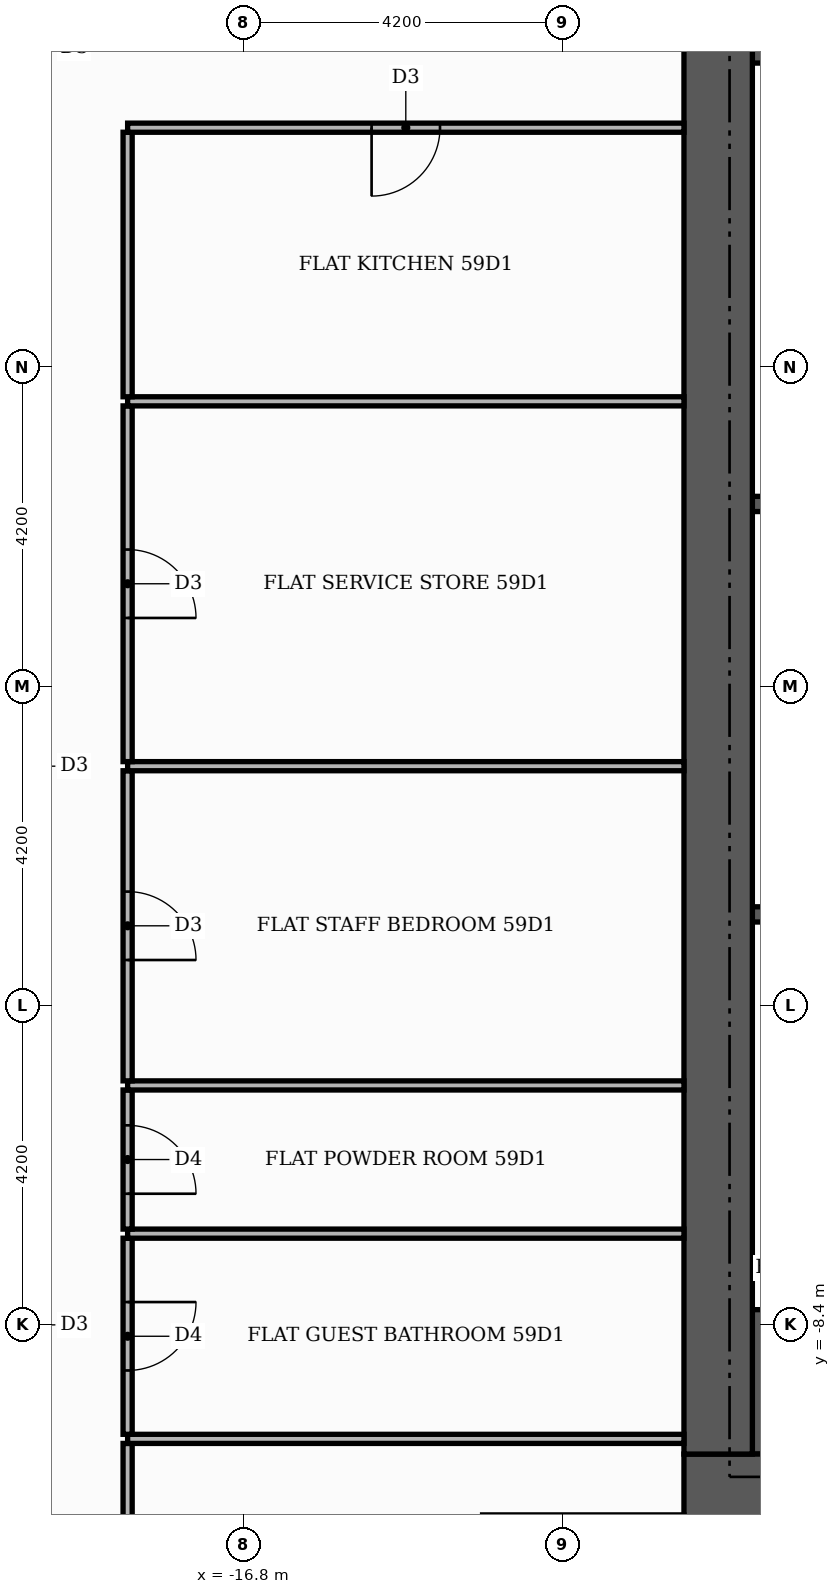
"""IFC4 building model, lengths in metres.
Left out: names, types, materials, properties, quantities, classifications, styles, units other than length and angle.
Written with IfcOpenShell. Run it as: python <this file> out.ifc"""

import sys

from ifc_helpers import new_model, si_unit, direction, frame, frame_2d, origin, place, context, subcontext, project, spatial, rectangle, extrude, element, fill, save


model = new_model("IFC4")
c1 = context("Model", 3, precision=1e-05, world=origin(), true_north=direction((0.0, 1.0)))
c2 = subcontext(c1, "Body", "Model", "MODEL_VIEW")
j1 = project(units=[si_unit("LENGTHUNIT", "METRE"), si_unit("PLANEANGLEUNIT", "RADIAN")], contexts=[c1])
p1 = place(None, origin())
s1 = spatial("IfcSite", under=j1, at=p1, CompositionType="ELEMENT")
p2 = place(p1, origin())
s2 = spatial("IfcBuilding", under=s1, at=p2, CompositionType="ELEMENT")
p3 = place(p2, frame((0.0, 0.0, 248.4)))
s3 = spatial("IfcBuildingStorey", under=s2, at=p3, CompositionType="ELEMENT", Elevation=248.4)
for number, where, z_axis, x_axis in (
    (1, (-10.1, -9.15, 0.0), (0.0, 0.0, 1.0), (1.0, 0.0, 0.0)),
    (2, (-10.1, 9.15, 0.0), (0.0, 0.0, 1.0), (1.0, 0.0, 0.0)),
):
    element("IfcWall", number, at=place(p3, frame(where, z_axis=z_axis, x_axis=x_axis)), inside=s3, PredefinedType="SHEAR", context=c2, shape_type="SweptSolid", body=[
        extrude(rectangle(XDim=4.6, YDim=1.9, at=frame_2d((2.3, 0.0))), origin(), (0.0, 0.0, 1.0), 3.48),
    ])
for number, where, z_axis, x_axis in (
    (3, (-10.1, -3.0, 0.0), (0.0, 0.0, 1.0), (1.0, 0.0, 0.0)),
    (4, (-10.1, 2.4, 0.0), (0.0, 0.0, 1.0), (1.0, 0.0, 0.0)),
):
    element("IfcWall", number, at=place(p3, frame(where, z_axis=z_axis, x_axis=x_axis)), inside=s3, PredefinedType="SHEAR", context=c2, shape_type="SweptSolid", body=[
        extrude(rectangle(XDim=0.9, YDim=0.2, at=frame_2d((0.45, 0.0))), origin(), (0.0, 0.0, 1.0), 3.48),
    ])
p4 = place(p3, frame((-11.0, -10.55, 0.0), z_axis=(0.0, 0.0, 1.0), x_axis=(1.0, 0.0, 0.0)))
e5 = element("IfcWall", 5, at=p4, inside=s3, PredefinedType="SHEAR", context=c2, shape_type="SweptSolid", body=[
    extrude(rectangle(XDim=22.0, YDim=0.9, at=frame_2d((11.0, 0.0))), origin(), (0.0, 0.0, 1.0), 3.48),
])
p5 = place(p4, frame((7.4, 0.0, 0.0)))
e6 = element("IfcOpeningElement", 6, at=p5, cuts=e5, PredefinedType="OPENING", context=c2, shape_type="SweptSolid", body=[
    extrude(rectangle(XDim=1.8, YDim=2.2, at=frame_2d((0.9, 1.1))), frame((0.0, 0.46, 0.0), z_axis=(0.0, -1.0, 0.0), x_axis=(1.0, 0.0, 0.0)), (0.0, 0.0, 1.0), 0.92),
])
p6 = place(p3, frame((-10.55, -10.1, 0.0), z_axis=(0.0, 0.0, 1.0), x_axis=(0.0, 1.0, 0.0)))
e7 = element("IfcWall", 7, at=p6, inside=s3, PredefinedType="SHEAR", context=c2, shape_type="SweptSolid", body=[
    extrude(rectangle(XDim=20.2, YDim=0.9, at=frame_2d((10.1, 0.0))), origin(), (0.0, 0.0, 1.0), 3.48),
])
p7 = place(p3, frame((-18.32, -13.55, 0.0), z_axis=(0.0, 0.0, 1.0), x_axis=(0.0, 1.0, 0.0)))
e8 = element("IfcWall", 8, at=p7, inside=s3, PredefinedType="PARTITIONING", context=c2, shape_type="SweptSolid", body=[
    extrude(rectangle(XDim=3.59, YDim=0.12, at=frame_2d((1.795, 0.0))), origin(), (0.0, 0.0, 1.0), 3.48),
])
p8 = place(p7, frame((1.325, 0.0, 0.0)))
e9 = element("IfcOpeningElement", 9, at=p8, cuts=e8, PredefinedType="OPENING", context=c2, shape_type="SweptSolid", body=[
    extrude(rectangle(XDim=0.9, YDim=2.1, at=frame_2d((0.45, 1.05))), frame((0.0, 0.07, 0.0), z_axis=(0.0, -1.0, 0.0), x_axis=(1.0, 0.0, 0.0)), (0.0, 0.0, 1.0), 0.14),
])
p9 = place(p3, frame((-18.32, -9.9, 0.0), z_axis=(0.0, 0.0, 1.0), x_axis=(1.0, 0.0, 0.0)))
e10 = element("IfcWall", 10, at=p9, inside=s3, PredefinedType="PARTITIONING", context=c2, shape_type="SweptSolid", body=[
    extrude(rectangle(XDim=7.32, YDim=0.12, at=frame_2d((3.66, 0.0))), origin(), (0.0, 0.0, 1.0), 3.48),
])
p10 = place(p3, frame((-18.32, -9.84, 0.0), z_axis=(0.0, 0.0, 1.0), x_axis=(0.0, 1.0, 0.0)))
e11 = element("IfcWall", 11, at=p10, inside=s3, PredefinedType="PARTITIONING", context=c2, shape_type="SweptSolid", body=[
    extrude(rectangle(XDim=2.58, YDim=0.12, at=frame_2d((1.29, 0.0))), origin(), (0.0, 0.0, 1.0), 3.48),
])
p11 = place(p10, frame((0.84, 0.0, 0.0)))
e12 = element("IfcOpeningElement", 12, at=p11, cuts=e11, PredefinedType="OPENING", context=c2, shape_type="SweptSolid", body=[
    extrude(rectangle(XDim=0.9, YDim=2.1, at=frame_2d((0.45, 1.05))), frame((0.0, 0.07, 0.0), z_axis=(0.0, -1.0, 0.0), x_axis=(1.0, 0.0, 0.0)), (0.0, 0.0, 1.0), 0.14),
])
p12 = place(p3, frame((-18.32, -7.2, 0.0), z_axis=(0.0, 0.0, 1.0), x_axis=(1.0, 0.0, 0.0)))
e13 = element("IfcWall", 13, at=p12, inside=s3, PredefinedType="PARTITIONING", context=c2, shape_type="SweptSolid", body=[
    extrude(rectangle(XDim=7.32, YDim=0.12, at=frame_2d((3.66, 0.0))), origin(), (0.0, 0.0, 1.0), 3.48),
])
p13 = place(p3, frame((-18.32, -7.14, 0.0), z_axis=(0.0, 0.0, 1.0), x_axis=(0.0, 1.0, 0.0)))
e14 = element("IfcWall", 14, at=p13, inside=s3, PredefinedType="PARTITIONING", context=c2, shape_type="SweptSolid", body=[
    extrude(rectangle(XDim=1.83, YDim=0.12, at=frame_2d((0.915, 0.0))), origin(), (0.0, 0.0, 1.0), 3.48),
])
p14 = place(p13, frame((0.465, 0.0, 0.0)))
e15 = element("IfcOpeningElement", 15, at=p14, cuts=e14, PredefinedType="OPENING", context=c2, shape_type="SweptSolid", body=[
    extrude(rectangle(XDim=0.9, YDim=2.1, at=frame_2d((0.45, 1.05))), frame((0.0, 0.07, 0.0), z_axis=(0.0, -1.0, 0.0), x_axis=(1.0, 0.0, 0.0)), (0.0, 0.0, 1.0), 0.14),
])
p15 = place(p3, frame((-18.32, -5.25, 0.0), z_axis=(0.0, 0.0, 1.0), x_axis=(1.0, 0.0, 0.0)))
e16 = element("IfcWall", 16, at=p15, inside=s3, PredefinedType="PARTITIONING", context=c2, shape_type="SweptSolid", body=[
    extrude(rectangle(XDim=7.32, YDim=0.12, at=frame_2d((3.66, 0.0))), origin(), (0.0, 0.0, 1.0), 3.48),
])
p16 = place(p3, frame((-18.32, -5.19, 0.0), z_axis=(0.0, 0.0, 1.0), x_axis=(0.0, 1.0, 0.0)))
e17 = element("IfcWall", 17, at=p16, inside=s3, PredefinedType="PARTITIONING", context=c2, shape_type="SweptSolid", body=[
    extrude(rectangle(XDim=4.08, YDim=0.12, at=frame_2d((2.04, 0.0))), origin(), (0.0, 0.0, 1.0), 3.48),
])
p17 = place(p16, frame((1.59, 0.0, 0.0)))
e18 = element("IfcOpeningElement", 18, at=p17, cuts=e17, PredefinedType="OPENING", context=c2, shape_type="SweptSolid", body=[
    extrude(rectangle(XDim=0.9, YDim=2.1, at=frame_2d((0.45, 1.05))), frame((0.0, 0.07, 0.0), z_axis=(0.0, -1.0, 0.0), x_axis=(1.0, 0.0, 0.0)), (0.0, 0.0, 1.0), 0.14),
])
p18 = place(p3, frame((-18.32, -1.05, 0.0), z_axis=(0.0, 0.0, 1.0), x_axis=(1.0, 0.0, 0.0)))
e19 = element("IfcWall", 19, at=p18, inside=s3, PredefinedType="PARTITIONING", context=c2, shape_type="SweptSolid", body=[
    extrude(rectangle(XDim=7.32, YDim=0.12, at=frame_2d((3.66, 0.0))), origin(), (0.0, 0.0, 1.0), 3.48),
])
p19 = place(p3, frame((-18.32, -0.99, 0.0), z_axis=(0.0, 0.0, 1.0), x_axis=(0.0, 1.0, 0.0)))
e20 = element("IfcWall", 20, at=p19, inside=s3, PredefinedType="PARTITIONING", context=c2, shape_type="SweptSolid", body=[
    extrude(rectangle(XDim=4.68, YDim=0.12, at=frame_2d((2.34, 0.0))), origin(), (0.0, 0.0, 1.0), 3.48),
])
p20 = place(p19, frame((1.89, 0.0, 0.0)))
e21 = element("IfcOpeningElement", 21, at=p20, cuts=e20, PredefinedType="OPENING", context=c2, shape_type="SweptSolid", body=[
    extrude(rectangle(XDim=0.9, YDim=2.1, at=frame_2d((0.45, 1.05))), frame((0.0, 0.07, 0.0), z_axis=(0.0, -1.0, 0.0), x_axis=(1.0, 0.0, 0.0)), (0.0, 0.0, 1.0), 0.14),
])
p21 = place(p3, frame((-18.32, 3.75, 0.0), z_axis=(0.0, 0.0, 1.0), x_axis=(1.0, 0.0, 0.0)))
e22 = element("IfcWall", 22, at=p21, inside=s3, PredefinedType="PARTITIONING", context=c2, shape_type="SweptSolid", body=[
    extrude(rectangle(XDim=7.32, YDim=0.12, at=frame_2d((3.66, 0.0))), origin(), (0.0, 0.0, 1.0), 3.48),
])
p22 = place(p3, frame((-18.32, 3.81, 0.0), z_axis=(0.0, 0.0, 1.0), x_axis=(0.0, 1.0, 0.0)))
e23 = element("IfcWall", 23, at=p22, inside=s3, PredefinedType="PARTITIONING", context=c2, shape_type="SweptSolid", body=[
    extrude(rectangle(XDim=3.48, YDim=0.12, at=frame_2d((1.74, 0.0))), origin(), (0.0, 0.0, 1.0), 3.48),
])
p23 = place(p3, frame((-18.32, 7.35, 0.0), z_axis=(0.0, 0.0, 1.0), x_axis=(1.0, 0.0, 0.0)))
e24 = element("IfcWall", 24, at=p23, inside=s3, PredefinedType="PARTITIONING", context=c2, shape_type="SweptSolid", body=[
    extrude(rectangle(XDim=7.32, YDim=0.12, at=frame_2d((3.66, 0.0))), origin(), (0.0, 0.0, 1.0), 3.48),
])
p24 = place(p23, frame((3.21, 0.0, 0.0)))
e25 = element("IfcOpeningElement", 25, at=p24, cuts=e24, PredefinedType="OPENING", context=c2, shape_type="SweptSolid", body=[
    extrude(rectangle(XDim=0.9, YDim=2.1, at=frame_2d((0.45, 1.05))), frame((0.0, 0.07, 0.0), z_axis=(0.0, -1.0, 0.0), x_axis=(1.0, 0.0, 0.0)), (0.0, 0.0, 1.0), 0.14),
])
p25 = place(p24, frame((0.9, 0.0, 0.0), z_axis=(0.0, 0.0, 1.0), x_axis=(-1.0, 0.0, 0.0)))
e26 = element("IfcDoor", 26, at=p25, inside=s3, OperationType="SINGLE_SWING_LEFT", PredefinedType="DOOR", context=c2, shape_type="SweptSolid", body=[
    extrude(rectangle(XDim=0.9, YDim=2.1, at=frame_2d((0.45, 1.05))), frame((0.0, 0.025, 0.0), z_axis=(0.0, -1.0, 0.0), x_axis=(1.0, 0.0, 0.0)), (0.0, 0.0, 1.0), 0.05),
])
fill(e25, e26)
p26 = place(p20, frame((0.9, 0.0, 0.0), z_axis=(0.0, 0.0, 1.0), x_axis=(-1.0, 0.0, 0.0)))
e27 = element("IfcDoor", 27, at=p26, inside=s3, OperationType="SINGLE_SWING_LEFT", PredefinedType="DOOR", context=c2, shape_type="SweptSolid", body=[
    extrude(rectangle(XDim=0.9, YDim=2.1, at=frame_2d((0.45, 1.05))), frame((0.0, 0.025, 0.0), z_axis=(0.0, -1.0, 0.0), x_axis=(1.0, 0.0, 0.0)), (0.0, 0.0, 1.0), 0.05),
])
fill(e21, e27)
p27 = place(p17, frame((0.9, 0.0, 0.0), z_axis=(0.0, 0.0, 1.0), x_axis=(-1.0, 0.0, 0.0)))
e28 = element("IfcDoor", 28, at=p27, inside=s3, OperationType="SINGLE_SWING_LEFT", PredefinedType="DOOR", context=c2, shape_type="SweptSolid", body=[
    extrude(rectangle(XDim=0.9, YDim=2.1, at=frame_2d((0.45, 1.05))), frame((0.0, 0.025, 0.0), z_axis=(0.0, -1.0, 0.0), x_axis=(1.0, 0.0, 0.0)), (0.0, 0.0, 1.0), 0.05),
])
fill(e18, e28)
p28 = place(p14, frame((0.9, 0.0, 0.0), z_axis=(0.0, 0.0, 1.0), x_axis=(-1.0, 0.0, 0.0)))
e29 = element("IfcDoor", 29, at=p28, inside=s3, OperationType="SINGLE_SWING_LEFT", PredefinedType="DOOR", context=c2, shape_type="SweptSolid", body=[
    extrude(rectangle(XDim=0.9, YDim=2.1, at=frame_2d((0.45, 1.05))), frame((0.0, 0.025, 0.0), z_axis=(0.0, -1.0, 0.0), x_axis=(1.0, 0.0, 0.0)), (0.0, 0.0, 1.0), 0.05),
])
fill(e15, e29)
p29 = place(p11, frame((0.9, 0.0, 0.0), z_axis=(0.0, 0.0, 1.0), x_axis=(-1.0, 0.0, 0.0)))
e30 = element("IfcDoor", 30, at=p29, inside=s3, OperationType="SINGLE_SWING_RIGHT", PredefinedType="DOOR", context=c2, shape_type="SweptSolid", body=[
    extrude(rectangle(XDim=0.9, YDim=2.1, at=frame_2d((0.45, 1.05))), frame((0.0, 0.025, 0.0), z_axis=(0.0, -1.0, 0.0), x_axis=(1.0, 0.0, 0.0)), (0.0, 0.0, 1.0), 0.05),
])
fill(e12, e30)
save(model, sys.argv[1])
